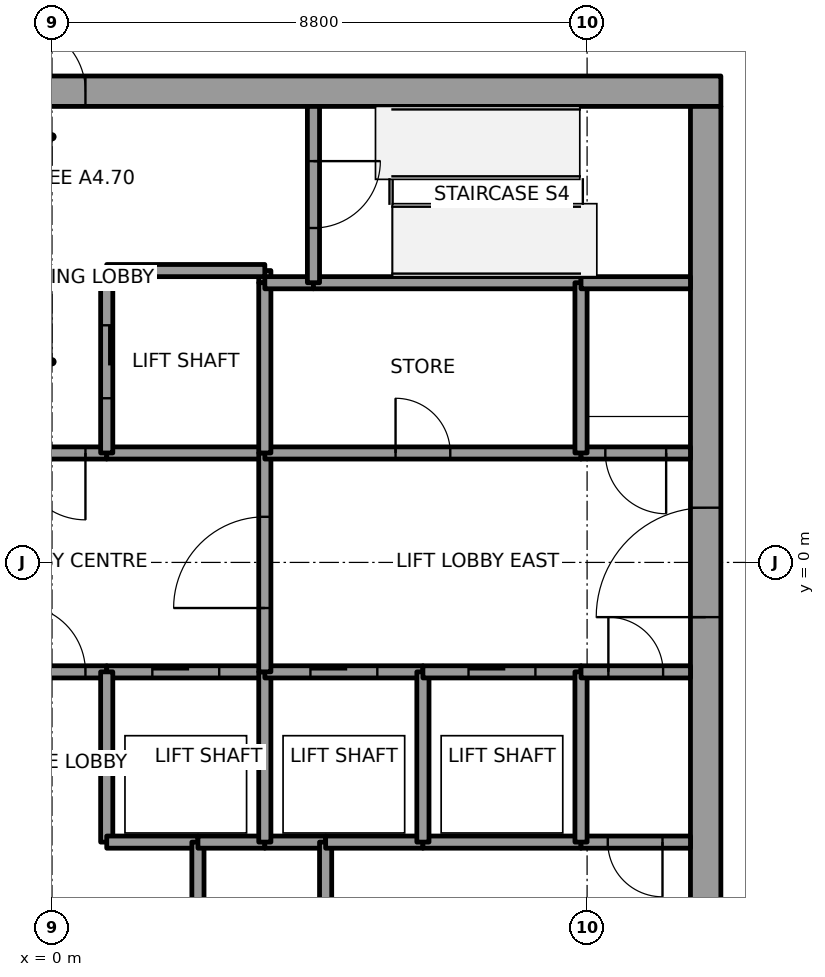
"""IFC4 building model, lengths in metres.
Left out: names, types, materials, properties, quantities, classifications, styles, units other than length and angle.
Written with IfcOpenShell. Run it as: python <this file> out.ifc"""

import sys

from ifc_helpers import new_model, si_unit, direction, frame, frame_2d, origin, place, context, subcontext, project, spatial, rectangle, extrude, element, fill, save


model = new_model("IFC4")
c1 = context("Model", 3, precision=1e-05, world=origin(), true_north=direction((0.0, 1.0)))
c2 = subcontext(c1, "Body", "Model", "MODEL_VIEW")
j1 = project(units=[si_unit("LENGTHUNIT", "METRE"), si_unit("PLANEANGLEUNIT", "RADIAN")], contexts=[c1])
p1 = place(None, origin())
s1 = spatial("IfcSite", under=j1, at=p1, CompositionType="ELEMENT")
p2 = place(p1, origin())
s2 = spatial("IfcBuilding", under=s1, at=p2, CompositionType="ELEMENT")
p3 = place(p2, frame((0.0, 0.0, 299.0)))
s3 = spatial("IfcBuildingStorey", under=s2, at=p3, CompositionType="ELEMENT", Elevation=299.0)
p4 = place(p3, frame((-11.0, 7.75, 0.0), z_axis=(0.0, 0.0, 1.0), x_axis=(1.0, 0.0, 0.0)))
e1 = element("IfcWall", 1, at=p4, inside=s3, PredefinedType="SHEAR", context=c2, shape_type="SweptSolid", body=[
    extrude(rectangle(XDim=22.0, YDim=0.5, at=frame_2d((11.0, 0.0))), origin(), (0.0, 0.0, 1.0), 4.0),
])
p5 = place(p4, frame((10.45, 0.0, 0.0)))
e2 = element("IfcOpeningElement", 2, at=p5, cuts=e1, PredefinedType="OPENING", context=c2, shape_type="SweptSolid", body=[
    extrude(rectangle(XDim=1.1, YDim=2.1, at=frame_2d((0.55, 1.05))), frame((0.0, 0.25, 0.0), z_axis=(0.0, -1.0, 0.0), x_axis=(1.0, 0.0, 0.0)), (0.0, 0.0, 1.0), 0.5),
])
p6 = place(p3, frame((10.75, -7.5, 0.0), z_axis=(0.0, 0.0, 1.0), x_axis=(0.0, 1.0, 0.0)))
e3 = element("IfcWall", 3, at=p6, inside=s3, PredefinedType="SHEAR", context=c2, shape_type="SweptSolid", body=[
    extrude(rectangle(XDim=15.0, YDim=0.5, at=frame_2d((7.5, 0.0))), origin(), (0.0, 0.0, 1.0), 4.0),
])
p7 = place(p6, frame((6.6, 0.0, 0.0)))
e4 = element("IfcOpeningElement", 4, at=p7, cuts=e3, PredefinedType="OPENING", context=c2, shape_type="SweptSolid", body=[
    extrude(rectangle(XDim=1.8, YDim=2.1, at=frame_2d((0.9, 1.05))), frame((0.0, 0.25, 0.0), z_axis=(0.0, -1.0, 0.0), x_axis=(1.0, 0.0, 0.0)), (0.0, 0.0, 1.0), 0.5),
])
p8 = place(p3, frame((-0.9, -1.8, 0.0), z_axis=(0.0, 0.0, 1.0), x_axis=(1.0, 0.0, 0.0)))
e5 = element("IfcWall", 5, at=p8, inside=s3, PredefinedType="SOLIDWALL", context=c2, shape_type="SweptSolid", body=[
    extrude(rectangle(XDim=1.8, YDim=0.2, at=frame_2d((0.9, 0.0))), origin(), (0.0, 0.0, 1.0), 3.85),
])
p9 = place(p8, frame((0.35, 0.0, 0.0)))
e6 = element("IfcOpeningElement", 6, at=p9, cuts=e5, PredefinedType="OPENING", context=c2, shape_type="SweptSolid", body=[
    extrude(rectangle(XDim=1.1, YDim=2.1, at=frame_2d((0.55, 1.05))), frame((0.0, 0.1, 0.0), z_axis=(0.0, -1.0, 0.0), x_axis=(1.0, 0.0, 0.0)), (0.0, 0.0, 1.0), 0.2),
])
p10 = place(p3, frame((0.9, 1.8, 0.0), z_axis=(0.0, 0.0, 1.0), x_axis=(-1.0, 0.0, 0.0)))
e7 = element("IfcWall", 7, at=p10, inside=s3, PredefinedType="SOLIDWALL", context=c2, shape_type="SweptSolid", body=[
    extrude(rectangle(XDim=1.8, YDim=0.2, at=frame_2d((0.9, 0.0))), origin(), (0.0, 0.0, 1.0), 3.85),
])
p11 = place(p10, frame((0.35, 0.0, 0.0)))
e8 = element("IfcOpeningElement", 8, at=p11, cuts=e7, PredefinedType="OPENING", context=c2, shape_type="SweptSolid", body=[
    extrude(rectangle(XDim=1.1, YDim=2.1, at=frame_2d((0.55, 1.05))), frame((0.0, 0.1, 0.0), z_axis=(0.0, -1.0, 0.0), x_axis=(1.0, 0.0, 0.0)), (0.0, 0.0, 1.0), 0.2),
])
p12 = place(p3, frame((0.9, -1.8, 0.0), z_axis=(0.0, 0.0, 1.0), x_axis=(1.0, 0.0, 0.0)))
e9 = element("IfcWall", 9, at=p12, inside=s3, PredefinedType="SOLIDWALL", context=c2, shape_type="SweptSolid", body=[
    extrude(rectangle(XDim=2.6, YDim=0.2, at=frame_2d((1.3, 0.0))), origin(), (0.0, 0.0, 1.0), 3.85),
])
p13 = place(p12, frame((0.75, 0.0, 0.0)))
e10 = element("IfcOpeningElement", 10, at=p13, cuts=e9, PredefinedType="OPENING", context=c2, shape_type="SweptSolid", body=[
    extrude(rectangle(XDim=1.1, YDim=2.1, at=frame_2d((0.55, 1.05))), frame((0.0, 0.1, 0.0), z_axis=(0.0, -1.0, 0.0), x_axis=(1.0, 0.0, 0.0)), (0.0, 0.0, 1.0), 0.2),
])
p14 = place(p3, frame((0.9, -1.8, 0.0), z_axis=(0.0, 0.0, 1.0), x_axis=(0.0, -1.0, 0.0)))
e11 = element("IfcWall", 11, at=p14, inside=s3, PredefinedType="SOLIDWALL", context=c2, shape_type="SweptSolid", body=[
    extrude(rectangle(XDim=2.8, YDim=0.2, at=frame_2d((1.4, 0.0))), origin(), (0.0, 0.0, 1.0), 3.85),
])
p15 = place(p3, frame((0.9, -4.6, 0.0), z_axis=(0.0, 0.0, 1.0), x_axis=(1.0, 0.0, 0.0)))
e12 = element("IfcWall", 12, at=p15, inside=s3, PredefinedType="SOLIDWALL", context=c2, shape_type="SweptSolid", body=[
    extrude(rectangle(XDim=1.5, YDim=0.2, at=frame_2d((0.75, 0.0))), origin(), (0.0, 0.0, 1.0), 3.85),
])
p16 = place(p3, frame((3.5, 1.8, 0.0), z_axis=(0.0, 0.0, 1.0), x_axis=(-1.0, 0.0, 0.0)))
e13 = element("IfcWall", 13, at=p16, inside=s3, PredefinedType="SOLIDWALL", context=c2, shape_type="SweptSolid", body=[
    extrude(rectangle(XDim=2.6, YDim=0.2, at=frame_2d((1.3, 0.0))), origin(), (0.0, 0.0, 1.0), 3.85),
])
p17 = place(p3, frame((3.5, 4.6, 0.0), z_axis=(0.0, 0.0, 1.0), x_axis=(0.0, 1.0, 0.0)))
e14 = element("IfcWall", 14, at=p17, inside=s3, PredefinedType="SOLIDWALL", context=c2, shape_type="SweptSolid", body=[
    extrude(rectangle(XDim=0.2, YDim=0.2, at=frame_2d((0.1, 0.0))), origin(), (0.0, 0.0, 1.0), 3.85),
])
p18 = place(p3, frame((3.5, 4.8, 0.0), z_axis=(0.0, 0.0, 1.0), x_axis=(-1.0, 0.0, 0.0)))
e15 = element("IfcWall", 15, at=p18, inside=s3, PredefinedType="SOLIDWALL", context=c2, shape_type="SweptSolid", body=[
    extrude(rectangle(XDim=2.6, YDim=0.2, at=frame_2d((1.3, 0.0))), origin(), (0.0, 0.0, 1.0), 3.85),
])
p19 = place(p3, frame((0.9, 4.8, 0.0), z_axis=(0.0, 0.0, 1.0), x_axis=(0.0, -1.0, 0.0)))
e16 = element("IfcWall", 16, at=p19, inside=s3, PredefinedType="SOLIDWALL", context=c2, shape_type="SweptSolid", body=[
    extrude(rectangle(XDim=3.0, YDim=0.2, at=frame_2d((1.5, 0.0))), origin(), (0.0, 0.0, 1.0), 3.85),
])
p20 = place(p19, frame((0.9, 0.0, 0.0)))
e17 = element("IfcOpeningElement", 17, at=p20, cuts=e16, PredefinedType="OPENING", context=c2, shape_type="SweptSolid", body=[
    extrude(rectangle(XDim=1.2, YDim=2.1, at=frame_2d((0.6, 1.05))), frame((0.0, 0.1, 0.0), z_axis=(0.0, -1.0, 0.0), x_axis=(1.0, 0.0, 0.0)), (0.0, 0.0, 1.0), 0.2),
])
p21 = place(p3, frame((2.4, -4.6, 0.0), z_axis=(0.0, 0.0, 1.0), x_axis=(0.0, -1.0, 0.0)))
e18 = element("IfcWall", 18, at=p21, inside=s3, PredefinedType="SOLIDWALL", context=c2, shape_type="SweptSolid", body=[
    extrude(rectangle(XDim=2.9, YDim=0.2, at=frame_2d((1.45, 0.0))), origin(), (0.0, 0.0, 1.0), 3.85),
])
p22 = place(p21, frame((1.0, 0.0, 0.0)))
e19 = element("IfcOpeningElement", 19, at=p22, cuts=e18, PredefinedType="OPENING", context=c2, shape_type="SweptSolid", body=[
    extrude(rectangle(XDim=0.9, YDim=2.1, at=frame_2d((0.45, 1.05))), frame((0.0, 0.1, 0.0), z_axis=(0.0, -1.0, 0.0), x_axis=(1.0, 0.0, 0.0)), (0.0, 0.0, 1.0), 0.2),
])
p23 = place(p3, frame((3.5, -4.6, 0.0), z_axis=(0.0, 0.0, 1.0), x_axis=(-1.0, 0.0, 0.0)))
e20 = element("IfcWall", 20, at=p23, inside=s3, PredefinedType="SOLIDWALL", context=c2, shape_type="SweptSolid", body=[
    extrude(rectangle(XDim=1.1, YDim=0.2, at=frame_2d((0.55, 0.0))), origin(), (0.0, 0.0, 1.0), 3.85),
])
p24 = place(p3, frame((4.5, -4.6, 0.0), z_axis=(0.0, 0.0, 1.0), x_axis=(-1.0, 0.0, 0.0)))
e21 = element("IfcWall", 21, at=p24, inside=s3, PredefinedType="SOLIDWALL", context=c2, shape_type="SweptSolid", body=[
    extrude(rectangle(XDim=1.0, YDim=0.2, at=frame_2d((0.5, 0.0))), origin(), (0.0, 0.0, 1.0), 3.85),
])
p25 = place(p3, frame((3.5, -4.6, 0.0), z_axis=(0.0, 0.0, 1.0), x_axis=(0.0, 1.0, 0.0)))
e22 = element("IfcWall", 22, at=p25, inside=s3, PredefinedType="SOLIDWALL", context=c2, shape_type="SweptSolid", body=[
    extrude(rectangle(XDim=2.8, YDim=0.2, at=frame_2d((1.4, 0.0))), origin(), (0.0, 0.0, 1.0), 3.85),
])
p26 = place(p3, frame((3.5, -1.8, 0.0), z_axis=(0.0, 0.0, 1.0), x_axis=(1.0, 0.0, 0.0)))
e23 = element("IfcWall", 23, at=p26, inside=s3, PredefinedType="SOLIDWALL", context=c2, shape_type="SweptSolid", body=[
    extrude(rectangle(XDim=2.6, YDim=0.2, at=frame_2d((1.3, 0.0))), origin(), (0.0, 0.0, 1.0), 3.85),
])
p27 = place(p26, frame((0.75, 0.0, 0.0)))
e24 = element("IfcOpeningElement", 24, at=p27, cuts=e23, PredefinedType="OPENING", context=c2, shape_type="SweptSolid", body=[
    extrude(rectangle(XDim=1.1, YDim=2.1, at=frame_2d((0.55, 1.05))), frame((0.0, 0.1, 0.0), z_axis=(0.0, -1.0, 0.0), x_axis=(1.0, 0.0, 0.0)), (0.0, 0.0, 1.0), 0.2),
])
p28 = place(p3, frame((3.5, -1.8, 0.0), z_axis=(0.0, 0.0, 1.0), x_axis=(0.0, 1.0, 0.0)))
e25 = element("IfcWall", 25, at=p28, inside=s3, PredefinedType="SOLIDWALL", context=c2, shape_type="SweptSolid", body=[
    extrude(rectangle(XDim=3.6, YDim=0.2, at=frame_2d((1.8, 0.0))), origin(), (0.0, 0.0, 1.0), 3.85),
])
p29 = place(p28, frame((1.05, 0.0, 0.0)))
e26 = element("IfcOpeningElement", 26, at=p29, cuts=e25, PredefinedType="OPENING", context=c2, shape_type="SweptSolid", body=[
    extrude(rectangle(XDim=1.5, YDim=2.1, at=frame_2d((0.75, 1.05))), frame((0.0, 0.1, 0.0), z_axis=(0.0, -1.0, 0.0), x_axis=(1.0, 0.0, 0.0)), (0.0, 0.0, 1.0), 0.2),
])
p30 = place(p3, frame((3.5, 1.8, 0.0), z_axis=(0.0, 0.0, 1.0), x_axis=(1.0, 0.0, 0.0)))
e27 = element("IfcWall", 27, at=p30, inside=s3, PredefinedType="SOLIDWALL", context=c2, shape_type="SweptSolid", body=[
    extrude(rectangle(XDim=5.2, YDim=0.2, at=frame_2d((2.6, 0.0))), origin(), (0.0, 0.0, 1.0), 3.85),
])
p31 = place(p30, frame((2.15, 0.0, 0.0)))
e28 = element("IfcOpeningElement", 28, at=p31, cuts=e27, PredefinedType="OPENING", context=c2, shape_type="SweptSolid", body=[
    extrude(rectangle(XDim=0.9, YDim=2.1, at=frame_2d((0.45, 1.05))), frame((0.0, 0.1, 0.0), z_axis=(0.0, -1.0, 0.0), x_axis=(1.0, 0.0, 0.0)), (0.0, 0.0, 1.0), 0.2),
])
p32 = place(p3, frame((3.5, 4.6, 0.0), z_axis=(0.0, 0.0, 1.0), x_axis=(0.0, -1.0, 0.0)))
e29 = element("IfcWall", 29, at=p32, inside=s3, PredefinedType="SOLIDWALL", context=c2, shape_type="SweptSolid", body=[
    extrude(rectangle(XDim=2.8, YDim=0.2, at=frame_2d((1.4, 0.0))), origin(), (0.0, 0.0, 1.0), 3.85),
])
p33 = place(p3, frame((4.3, 4.6, 0.0), z_axis=(0.0, 0.0, 1.0), x_axis=(-1.0, 0.0, 0.0)))
e30 = element("IfcWall", 30, at=p33, inside=s3, PredefinedType="SOLIDWALL", context=c2, shape_type="SweptSolid", body=[
    extrude(rectangle(XDim=0.8, YDim=0.2, at=frame_2d((0.4, 0.0))), origin(), (0.0, 0.0, 1.0), 3.85),
])
p34 = place(p3, frame((8.7, 4.6, 0.0), z_axis=(0.0, 0.0, 1.0), x_axis=(-1.0, 0.0, 0.0)))
e31 = element("IfcWall", 31, at=p34, inside=s3, PredefinedType="SOLIDWALL", context=c2, shape_type="SweptSolid", body=[
    extrude(rectangle(XDim=4.4, YDim=0.2, at=frame_2d((2.2, 0.0))), origin(), (0.0, 0.0, 1.0), 3.85),
])
p35 = place(p3, frame((4.3, 7.5, 0.0), z_axis=(0.0, 0.0, 1.0), x_axis=(0.0, -1.0, 0.0)))
e32 = element("IfcWall", 32, at=p35, inside=s3, PredefinedType="SOLIDWALL", context=c2, shape_type="SweptSolid", body=[
    extrude(rectangle(XDim=2.9, YDim=0.2, at=frame_2d((1.45, 0.0))), origin(), (0.0, 0.0, 1.0), 3.85),
])
p36 = place(p35, frame((0.9, 0.0, 0.0)))
e33 = element("IfcOpeningElement", 33, at=p36, cuts=e32, PredefinedType="OPENING", context=c2, shape_type="SweptSolid", body=[
    extrude(rectangle(XDim=1.1, YDim=2.1, at=frame_2d((0.55, 1.05))), frame((0.0, 0.1, 0.0), z_axis=(0.0, -1.0, 0.0), x_axis=(1.0, 0.0, 0.0)), (0.0, 0.0, 1.0), 0.2),
])
p37 = place(p3, frame((4.5, -4.6, 0.0), z_axis=(0.0, 0.0, 1.0), x_axis=(0.0, -1.0, 0.0)))
e34 = element("IfcWall", 34, at=p37, inside=s3, PredefinedType="SOLIDWALL", context=c2, shape_type="SweptSolid", body=[
    extrude(rectangle(XDim=2.9, YDim=0.2, at=frame_2d((1.45, 0.0))), origin(), (0.0, 0.0, 1.0), 3.85),
])
p38 = place(p3, frame((6.1, -4.6, 0.0), z_axis=(0.0, 0.0, 1.0), x_axis=(-1.0, 0.0, 0.0)))
e35 = element("IfcWall", 35, at=p38, inside=s3, PredefinedType="SOLIDWALL", context=c2, shape_type="SweptSolid", body=[
    extrude(rectangle(XDim=1.6, YDim=0.2, at=frame_2d((0.8, 0.0))), origin(), (0.0, 0.0, 1.0), 3.85),
])
p39 = place(p3, frame((8.7, -4.6, 0.0), z_axis=(0.0, 0.0, 1.0), x_axis=(-1.0, 0.0, 0.0)))
e36 = element("IfcWall", 36, at=p39, inside=s3, PredefinedType="SOLIDWALL", context=c2, shape_type="SweptSolid", body=[
    extrude(rectangle(XDim=2.6, YDim=0.2, at=frame_2d((1.3, 0.0))), origin(), (0.0, 0.0, 1.0), 3.85),
])
p40 = place(p3, frame((6.1, -4.6, 0.0), z_axis=(0.0, 0.0, 1.0), x_axis=(0.0, 1.0, 0.0)))
e37 = element("IfcWall", 37, at=p40, inside=s3, PredefinedType="SOLIDWALL", context=c2, shape_type="SweptSolid", body=[
    extrude(rectangle(XDim=2.8, YDim=0.2, at=frame_2d((1.4, 0.0))), origin(), (0.0, 0.0, 1.0), 3.85),
])
p41 = place(p3, frame((6.1, -1.8, 0.0), z_axis=(0.0, 0.0, 1.0), x_axis=(1.0, 0.0, 0.0)))
e38 = element("IfcWall", 38, at=p41, inside=s3, PredefinedType="SOLIDWALL", context=c2, shape_type="SweptSolid", body=[
    extrude(rectangle(XDim=2.6, YDim=0.2, at=frame_2d((1.3, 0.0))), origin(), (0.0, 0.0, 1.0), 3.85),
])
p42 = place(p41, frame((0.75, 0.0, 0.0)))
e39 = element("IfcOpeningElement", 39, at=p42, cuts=e38, PredefinedType="OPENING", context=c2, shape_type="SweptSolid", body=[
    extrude(rectangle(XDim=1.1, YDim=2.1, at=frame_2d((0.55, 1.05))), frame((0.0, 0.1, 0.0), z_axis=(0.0, -1.0, 0.0), x_axis=(1.0, 0.0, 0.0)), (0.0, 0.0, 1.0), 0.2),
])
p43 = place(p3, frame((10.5, -4.6, 0.0), z_axis=(0.0, 0.0, 1.0), x_axis=(-1.0, 0.0, 0.0)))
e40 = element("IfcWall", 40, at=p43, inside=s3, PredefinedType="SOLIDWALL", context=c2, shape_type="SweptSolid", body=[
    extrude(rectangle(XDim=1.8, YDim=0.2, at=frame_2d((0.9, 0.0))), origin(), (0.0, 0.0, 1.0), 3.85),
])
p44 = place(p43, frame((0.46, 0.0, 0.0)))
e41 = element("IfcOpeningElement", 41, at=p44, cuts=e40, PredefinedType="OPENING", context=c2, shape_type="SweptSolid", body=[
    extrude(rectangle(XDim=0.9, YDim=2.1, at=frame_2d((0.45, 1.05))), frame((0.0, 0.1, 0.0), z_axis=(0.0, -1.0, 0.0), x_axis=(1.0, 0.0, 0.0)), (0.0, 0.0, 1.0), 0.2),
])
p45 = place(p3, frame((8.7, -1.8, 0.0), z_axis=(0.0, 0.0, 1.0), x_axis=(0.0, -1.0, 0.0)))
e42 = element("IfcWall", 42, at=p45, inside=s3, PredefinedType="SOLIDWALL", context=c2, shape_type="SweptSolid", body=[
    extrude(rectangle(XDim=2.8, YDim=0.2, at=frame_2d((1.4, 0.0))), origin(), (0.0, 0.0, 1.0), 3.85),
])
p46 = place(p3, frame((8.7, -1.8, 0.0), z_axis=(0.0, 0.0, 1.0), x_axis=(1.0, 0.0, 0.0)))
e43 = element("IfcWall", 43, at=p46, inside=s3, PredefinedType="SOLIDWALL", context=c2, shape_type="SweptSolid", body=[
    extrude(rectangle(XDim=1.8, YDim=0.2, at=frame_2d((0.9, 0.0))), origin(), (0.0, 0.0, 1.0), 3.85),
])
p47 = place(p46, frame((0.45, 0.0, 0.0)))
e44 = element("IfcOpeningElement", 44, at=p47, cuts=e43, PredefinedType="OPENING", context=c2, shape_type="SweptSolid", body=[
    extrude(rectangle(XDim=0.9, YDim=2.1, at=frame_2d((0.45, 1.05))), frame((0.0, 0.1, 0.0), z_axis=(0.0, -1.0, 0.0), x_axis=(1.0, 0.0, 0.0)), (0.0, 0.0, 1.0), 0.2),
])
p48 = place(p3, frame((10.5, 1.8, 0.0), z_axis=(0.0, 0.0, 1.0), x_axis=(-1.0, 0.0, 0.0)))
e45 = element("IfcWall", 45, at=p48, inside=s3, PredefinedType="SOLIDWALL", context=c2, shape_type="SweptSolid", body=[
    extrude(rectangle(XDim=1.8, YDim=0.2, at=frame_2d((0.9, 0.0))), origin(), (0.0, 0.0, 1.0), 3.85),
])
p49 = place(p48, frame((0.4, 0.0, 0.0)))
e46 = element("IfcOpeningElement", 46, at=p49, cuts=e45, PredefinedType="OPENING", context=c2, shape_type="SweptSolid", body=[
    extrude(rectangle(XDim=1.0, YDim=2.1, at=frame_2d((0.5, 1.05))), frame((0.0, 0.1, 0.0), z_axis=(0.0, -1.0, 0.0), x_axis=(1.0, 0.0, 0.0)), (0.0, 0.0, 1.0), 0.2),
])
p50 = place(p3, frame((8.7, 1.8, 0.0), z_axis=(0.0, 0.0, 1.0), x_axis=(0.0, 1.0, 0.0)))
e47 = element("IfcWall", 47, at=p50, inside=s3, PredefinedType="SOLIDWALL", context=c2, shape_type="SweptSolid", body=[
    extrude(rectangle(XDim=2.8, YDim=0.2, at=frame_2d((1.4, 0.0))), origin(), (0.0, 0.0, 1.0), 3.85),
])
p51 = place(p3, frame((10.5, 4.6, 0.0), z_axis=(0.0, 0.0, 1.0), x_axis=(-1.0, 0.0, 0.0)))
e48 = element("IfcWall", 48, at=p51, inside=s3, PredefinedType="SOLIDWALL", context=c2, shape_type="SweptSolid", body=[
    extrude(rectangle(XDim=1.8, YDim=0.2, at=frame_2d((0.9, 0.0))), origin(), (0.0, 0.0, 1.0), 3.85),
])
p52 = place(p13, origin())
e49 = element("IfcDoor", 49, at=p52, inside=s3, OperationType="SLIDING_TO_LEFT", PredefinedType="DOOR", context=c2, shape_type="SweptSolid", body=[
    extrude(rectangle(XDim=1.1, YDim=2.1, at=frame_2d((0.55, 1.05))), frame((0.0, 0.025, 0.0), z_axis=(0.0, -1.0, 0.0), x_axis=(1.0, 0.0, 0.0)), (0.0, 0.0, 1.0), 0.05),
])
fill(e10, e49)
p53 = place(p27, origin())
e50 = element("IfcDoor", 50, at=p53, inside=s3, OperationType="SLIDING_TO_LEFT", PredefinedType="DOOR", context=c2, shape_type="SweptSolid", body=[
    extrude(rectangle(XDim=1.1, YDim=2.1, at=frame_2d((0.55, 1.05))), frame((0.0, 0.025, 0.0), z_axis=(0.0, -1.0, 0.0), x_axis=(1.0, 0.0, 0.0)), (0.0, 0.0, 1.0), 0.05),
])
fill(e24, e50)
p54 = place(p42, origin())
e51 = element("IfcDoor", 51, at=p54, inside=s3, OperationType="SLIDING_TO_LEFT", PredefinedType="DOOR", context=c2, shape_type="SweptSolid", body=[
    extrude(rectangle(XDim=1.1, YDim=2.1, at=frame_2d((0.55, 1.05))), frame((0.0, 0.025, 0.0), z_axis=(0.0, -1.0, 0.0), x_axis=(1.0, 0.0, 0.0)), (0.0, 0.0, 1.0), 0.05),
])
fill(e39, e51)
p55 = place(p20, origin())
e52 = element("IfcDoor", 52, at=p55, inside=s3, OperationType="SLIDING_TO_RIGHT", PredefinedType="DOOR", context=c2, shape_type="SweptSolid", body=[
    extrude(rectangle(XDim=1.2, YDim=2.1, at=frame_2d((0.6, 1.05))), frame((0.0, 0.025, 0.0), z_axis=(0.0, -1.0, 0.0), x_axis=(1.0, 0.0, 0.0)), (0.0, 0.0, 1.0), 0.05),
])
fill(e17, e52)
p56 = place(p29, origin())
e53 = element("IfcDoor", 53, at=p56, inside=s3, OperationType="DOUBLE_DOOR_SINGLE_SWING", PredefinedType="DOOR", context=c2, shape_type="SweptSolid", body=[
    extrude(rectangle(XDim=1.5, YDim=2.1, at=frame_2d((0.75, 1.05))), frame((0.0, 0.025, 0.0), z_axis=(0.0, -1.0, 0.0), x_axis=(1.0, 0.0, 0.0)), (0.0, 0.0, 1.0), 0.05),
])
fill(e26, e53)
p57 = place(p11, origin())
e54 = element("IfcDoor", 54, at=p57, inside=s3, OperationType="SINGLE_SWING_RIGHT", PredefinedType="DOOR", context=c2, shape_type="SweptSolid", body=[
    extrude(rectangle(XDim=1.1, YDim=2.1, at=frame_2d((0.55, 1.05))), frame((0.0, 0.025, 0.0), z_axis=(0.0, -1.0, 0.0), x_axis=(1.0, 0.0, 0.0)), (0.0, 0.0, 1.0), 0.05),
])
fill(e8, e54)
p58 = place(p9, origin())
e55 = element("IfcDoor", 55, at=p58, inside=s3, OperationType="SINGLE_SWING_LEFT", PredefinedType="DOOR", context=c2, shape_type="SweptSolid", body=[
    extrude(rectangle(XDim=1.1, YDim=2.1, at=frame_2d((0.55, 1.05))), frame((0.0, 0.025, 0.0), z_axis=(0.0, -1.0, 0.0), x_axis=(1.0, 0.0, 0.0)), (0.0, 0.0, 1.0), 0.05),
])
fill(e6, e55)
p59 = place(p49, origin())
e56 = element("IfcDoor", 56, at=p59, inside=s3, OperationType="SINGLE_SWING_RIGHT", PredefinedType="DOOR", context=c2, shape_type="SweptSolid", body=[
    extrude(rectangle(XDim=1.0, YDim=2.1, at=frame_2d((0.5, 1.05))), frame((0.0, 0.025, 0.0), z_axis=(0.0, -1.0, 0.0), x_axis=(1.0, 0.0, 0.0)), (0.0, 0.0, 1.0), 0.05),
])
fill(e46, e56)
p60 = place(p36, origin())
e57 = element("IfcDoor", 57, at=p60, inside=s3, OperationType="SINGLE_SWING_RIGHT", PredefinedType="DOOR", context=c2, shape_type="SweptSolid", body=[
    extrude(rectangle(XDim=1.1, YDim=2.1, at=frame_2d((0.55, 1.05))), frame((0.0, 0.025, 0.0), z_axis=(0.0, -1.0, 0.0), x_axis=(1.0, 0.0, 0.0)), (0.0, 0.0, 1.0), 0.05),
])
fill(e33, e57)
p61 = place(p31, origin())
e58 = element("IfcDoor", 58, at=p61, inside=s3, OperationType="SINGLE_SWING_RIGHT", PredefinedType="DOOR", context=c2, shape_type="SweptSolid", body=[
    extrude(rectangle(XDim=0.9, YDim=2.1, at=frame_2d((0.45, 1.05))), frame((0.0, 0.025, 0.0), z_axis=(0.0, -1.0, 0.0), x_axis=(1.0, 0.0, 0.0)), (0.0, 0.0, 1.0), 0.05),
])
fill(e28, e58)
p62 = place(p44, origin())
e59 = element("IfcDoor", 59, at=p62, inside=s3, OperationType="SINGLE_SWING_RIGHT", PredefinedType="DOOR", context=c2, shape_type="SweptSolid", body=[
    extrude(rectangle(XDim=0.9, YDim=2.1, at=frame_2d((0.45, 1.05))), frame((0.0, 0.025, 0.0), z_axis=(0.0, -1.0, 0.0), x_axis=(1.0, 0.0, 0.0)), (0.0, 0.0, 1.0), 0.05),
])
fill(e41, e59)
p63 = place(p47, origin())
e60 = element("IfcDoor", 60, at=p63, inside=s3, OperationType="SINGLE_SWING_LEFT", PredefinedType="DOOR", context=c2, shape_type="SweptSolid", body=[
    extrude(rectangle(XDim=0.9, YDim=2.1, at=frame_2d((0.45, 1.05))), frame((0.0, 0.025, 0.0), z_axis=(0.0, -1.0, 0.0), x_axis=(1.0, 0.0, 0.0)), (0.0, 0.0, 1.0), 0.05),
])
fill(e44, e60)
p64 = place(p7, origin())
e61 = element("IfcDoor", 61, at=p64, inside=s3, OperationType="DOUBLE_DOOR_SINGLE_SWING", PredefinedType="DOOR", context=c2, shape_type="SweptSolid", body=[
    extrude(rectangle(XDim=1.8, YDim=2.1, at=frame_2d((0.9, 1.05))), frame((0.0, 0.025, 0.0), z_axis=(0.0, -1.0, 0.0), x_axis=(1.0, 0.0, 0.0)), (0.0, 0.0, 1.0), 0.05),
])
fill(e4, e61)
p65 = place(p5, origin())
e62 = element("IfcDoor", 62, at=p65, inside=s3, OperationType="SINGLE_SWING_LEFT", PredefinedType="DOOR", context=c2, shape_type="SweptSolid", body=[
    extrude(rectangle(XDim=1.1, YDim=2.1, at=frame_2d((0.55, 1.05))), frame((0.0, 0.025, 0.0), z_axis=(0.0, -1.0, 0.0), x_axis=(1.0, 0.0, 0.0)), (0.0, 0.0, 1.0), 0.05),
])
fill(e2, e62)
save(model, sys.argv[1])
